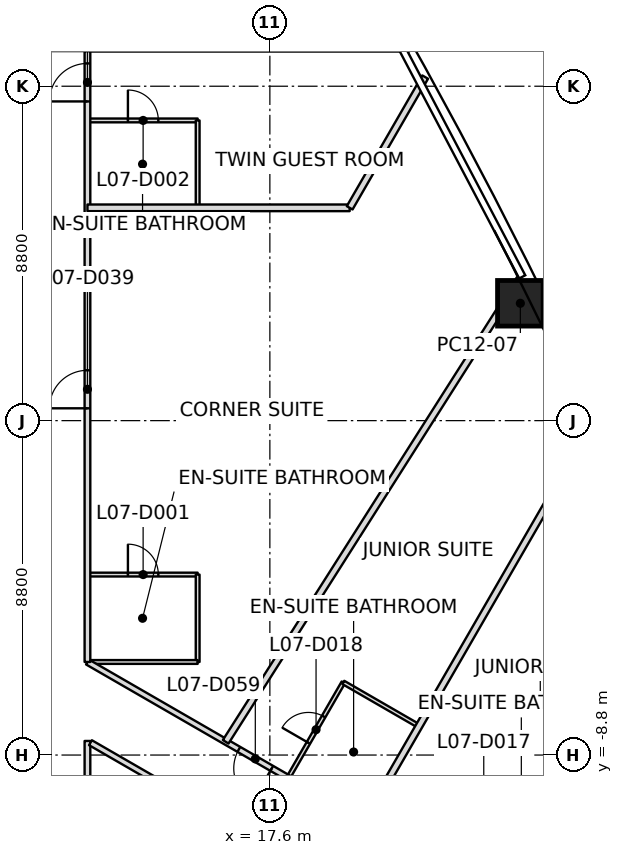
"""IFC4 building model, lengths in metres.
Left out: names, types, materials, properties, quantities, classifications, styles, units other than length and angle.
Written with IfcOpenShell. Run it as: python <this file> out.ifc"""

import sys

from ifc_helpers import new_model, si_unit, direction, frame, frame_2d, origin, origin_2d, place, context, subcontext, project, spatial, rectangle, extrude, clip, halfspace, element, fill, save


model = new_model("IFC4")
c1 = context("Model", 3, precision=1e-05, world=origin(), true_north=direction((0.0, 1.0)))
c2 = subcontext(c1, "Body", "Model", "MODEL_VIEW")
j1 = project(units=[si_unit("LENGTHUNIT", "METRE"), si_unit("PLANEANGLEUNIT", "RADIAN")], contexts=[c1])
p1 = place(None, origin())
s1 = spatial("IfcSite", under=j1, at=p1, CompositionType="ELEMENT")
p2 = place(p1, origin())
s2 = spatial("IfcBuilding", under=s1, at=p2, CompositionType="ELEMENT")
p3 = place(p2, frame((0.0, 0.0, 48.0)))
s3 = spatial("IfcBuildingStorey", under=s2, at=p3, CompositionType="ELEMENT", Elevation=48.0)
p4 = place(p3, frame((24.191, 3.088, 0.0), z_axis=(-0.015306644787, 0.002309192102, 0.99988017995), x_axis=(-0.441920685772, 0.897010601558, -0.008836751577)))
e1 = element("IfcColumn", 1, at=p4, inside=s3, PredefinedType="COLUMN", context=c2, shape_type="SweptSolid", body=[
    clip(extrude(rectangle(XDim=1.2, YDim=1.2, at=origin_2d()), origin(), (0.0, 0.0, 1.0), 3.7), halfspace(frame((0.0, 0.0, 0.003)), True)),
])
p5 = place(p3, frame((12.8, 5.6, 0.0), z_axis=(0.0, 0.0, 1.0), x_axis=(1.0, 0.0, 0.0)))
e2 = element("IfcWall", 2, at=p5, inside=s3, PredefinedType="PARTITIONING", context=c2, shape_type="SweptSolid", body=[
    extrude(rectangle(XDim=6.9, YDim=0.175, at=frame_2d((3.45, 0.0))), origin(), (0.0, 0.0, 1.0), 3.093),
])
p6 = place(p3, frame((19.7, 5.6, 0.0), z_axis=(0.0, 0.0, 1.0), x_axis=(0.500045167768, 0.865999324591, 0.0)))
e3 = element("IfcWall", 3, at=p6, inside=s3, PredefinedType="PARTITIONING", context=c2, shape_type="SweptSolid", body=[
    extrude(rectangle(XDim=3.973, YDim=0.175, at=frame_2d((1.986, 0.0))), origin(), (0.0, 0.0, 1.0), 2.934),
])
p7 = place(p3, frame((24.174, 3.728, 0.0), z_axis=(0.0, 0.0, 1.0), x_axis=(-0.536240308602, -0.844065359691, 0.0)))
e4 = element("IfcWall", 4, at=p7, inside=s3, PredefinedType="PARTITIONING", context=c2, shape_type="SweptSolid", body=[
    extrude(rectangle(XDim=14.428, YDim=0.175, at=frame_2d((7.214, 0.0))), origin(), (0.0, 0.0, 1.0), 2.947),
])
p8 = place(p3, frame((20.075, -10.551, 0.0), z_axis=(0.0, 0.0, 1.0), x_axis=(0.499996220184, 0.866027586051, 0.0)))
e5 = element("IfcWall", 5, at=p8, inside=s3, PredefinedType="PARTITIONING", context=c2, shape_type="SweptSolid", body=[
    extrude(rectangle(XDim=12.274, YDim=0.175, at=frame_2d((6.137, 0.0))), origin(), (0.0, 0.0, 1.0), 2.934),
])
p9 = place(p3, frame((24.488, -13.099, 0.0), z_axis=(0.0, 0.0, 1.0), x_axis=(0.500003147101, 0.866023586797, 0.0)))
e6 = element("IfcWall", 6, at=p9, inside=s3, PredefinedType="PARTITIONING", context=c2, shape_type="SweptSolid", body=[
    extrude(rectangle(XDim=8.508, YDim=0.175, at=frame_2d((4.254, 0.0))), origin(), (0.0, 0.0, 1.0), 2.934),
])
p10 = place(p3, frame((12.8, -9.72, 0.0), z_axis=(0.0, 0.0, 1.0), x_axis=(0.0, 1.0, 0.0)))
e7 = element("IfcWall", 7, at=p10, inside=s3, PredefinedType="PARTITIONING", context=c2, shape_type="SweptSolid", body=[
    extrude(rectangle(XDim=1.291, YDim=0.15, at=frame_2d((0.646, 0.0))), origin(), (0.0, 0.0, 1.0), 2.797),
])
p11 = place(p3, frame((12.879, -8.475, 0.0), z_axis=(0.0, 0.0, 1.0), x_axis=(0.866021836803, -0.500006178143, 0.0)))
e8 = element("IfcWall", 8, at=p11, inside=s3, PredefinedType="PARTITIONING", context=c2, shape_type="SweptSolid", body=[
    extrude(rectangle(XDim=12.365, YDim=0.15, at=frame_2d((6.182, 0.0))), origin(), (0.0, 0.0, 1.0), 2.797),
])
p12 = place(p11, frame((4.737, 0.0, 0.0)))
e9 = element("IfcOpeningElement", 9, at=p12, cuts=e8, PredefinedType="OPENING", context=c2, shape_type="SweptSolid", body=[
    extrude(rectangle(XDim=1.0, YDim=2.1, at=frame_2d((0.5, 1.05))), frame((0.0, 0.075, 0.0), z_axis=(0.0, -1.0, 0.0), x_axis=(1.0, 0.0, 0.0)), (0.0, 0.0, 1.0), 0.15),
])
p13 = place(p11, frame((10.965, 0.0, 0.0)))
e10 = element("IfcOpeningElement", 10, at=p13, cuts=e8, PredefinedType="OPENING", context=c2, shape_type="SweptSolid", body=[
    extrude(rectangle(XDim=1.0, YDim=2.1, at=frame_2d((0.5, 1.05))), frame((0.0, 0.075, 0.0), z_axis=(0.0, -1.0, 0.0), x_axis=(1.0, 0.0, 0.0)), (0.0, 0.0, 1.0), 0.15),
])
p14 = place(p3, frame((24.418, -13.059, 0.0), z_axis=(0.0, 0.0, 1.0), x_axis=(-0.866024967305, 0.500000756004, 0.0)))
e11 = element("IfcWall", 11, at=p14, inside=s3, PredefinedType="PARTITIONING", context=c2, shape_type="SweptSolid", body=[
    extrude(rectangle(XDim=13.416, YDim=0.15, at=frame_2d((6.708, 0.0))), origin(), (0.0, 0.0, 1.0), 2.947),
])
p15 = place(p14, frame((3.168, 0.0, 0.0)))
e12 = element("IfcOpeningElement", 12, at=p15, cuts=e11, PredefinedType="OPENING", context=c2, shape_type="SweptSolid", body=[
    extrude(rectangle(XDim=1.0, YDim=2.1, at=frame_2d((0.5, 1.05))), frame((0.0, 0.075, 0.0), z_axis=(0.0, -1.0, 0.0), x_axis=(1.0, 0.0, 0.0)), (0.0, 0.0, 1.0), 0.15),
])
p16 = place(p14, frame((7.815, 0.0, 0.0)))
e13 = element("IfcOpeningElement", 13, at=p16, cuts=e11, PredefinedType="OPENING", context=c2, shape_type="SweptSolid", body=[
    extrude(rectangle(XDim=1.0, YDim=2.1, at=frame_2d((0.5, 1.05))), frame((0.0, 0.075, 0.0), z_axis=(0.0, -1.0, 0.0), x_axis=(1.0, 0.0, 0.0)), (0.0, 0.0, 1.0), 0.15),
])
p17 = place(p3, frame((12.8, -6.351, 0.0), z_axis=(0.0, 0.0, 1.0), x_axis=(0.0, 1.0, 0.0)))
e14 = element("IfcWall", 14, at=p17, inside=s3, PredefinedType="PARTITIONING", context=c2, shape_type="SweptSolid", body=[
    extrude(rectangle(XDim=16.071, YDim=0.15, at=frame_2d((8.035, 0.0))), origin(), (0.0, 0.0, 1.0), 3.017),
])
p18 = place(p17, frame((6.676, 0.0, 0.0)))
e15 = element("IfcOpeningElement", 15, at=p18, cuts=e14, PredefinedType="OPENING", context=c2, shape_type="SweptSolid", body=[
    extrude(rectangle(XDim=1.0, YDim=2.1, at=frame_2d((0.5, 1.05))), frame((0.0, 0.075, 0.0), z_axis=(0.0, -1.0, 0.0), x_axis=(1.0, 0.0, 0.0)), (0.0, 0.0, 1.0), 0.15),
])
p19 = place(p17, frame((14.751, 0.0, 0.0)))
e16 = element("IfcOpeningElement", 16, at=p19, cuts=e14, PredefinedType="OPENING", context=c2, shape_type="SweptSolid", body=[
    extrude(rectangle(XDim=1.0, YDim=2.1, at=frame_2d((0.5, 1.05))), frame((0.0, 0.075, 0.0), z_axis=(0.0, -1.0, 0.0), x_axis=(1.0, 0.0, 0.0)), (0.0, 0.0, 1.0), 0.15),
])
p20 = place(p3, frame((12.83, -4.051, 0.0), z_axis=(0.0, 0.0, 1.0), x_axis=(1.0, 0.0, 0.0)))
e17 = element("IfcWall", 17, at=p20, inside=s3, PredefinedType="PARTITIONING", context=c2, shape_type="SweptSolid", body=[
    extrude(rectangle(XDim=2.87, YDim=0.1, at=frame_2d((1.435, 0.0))), origin(), (0.0, 0.0, 1.0), 3.15),
])
p21 = place(p20, frame((1.035, 0.0, 0.0)))
e18 = element("IfcOpeningElement", 18, at=p21, cuts=e17, PredefinedType="OPENING", context=c2, shape_type="SweptSolid", body=[
    extrude(rectangle(XDim=0.8, YDim=2.1, at=frame_2d((0.4, 1.05))), frame((0.0, 0.05, 0.0), z_axis=(0.0, -1.0, 0.0), x_axis=(1.0, 0.0, 0.0)), (0.0, 0.0, 1.0), 0.1),
])
p22 = place(p3, frame((15.7, -4.051, 0.0), z_axis=(0.0, 0.0, 1.0), x_axis=(0.0, -1.0, 0.0)))
e19 = element("IfcWall", 19, at=p22, inside=s3, PredefinedType="PARTITIONING", context=c2, shape_type="SweptSolid", body=[
    extrude(rectangle(XDim=2.3, YDim=0.1, at=frame_2d((1.15, 0.0))), origin(), (0.0, 0.0, 1.0), 2.947),
])
p23 = place(p3, frame((15.7, -6.351, 0.0), z_axis=(0.0, 0.0, 1.0), x_axis=(-1.0, 0.0, 0.0)))
e20 = element("IfcWall", 20, at=p23, inside=s3, PredefinedType="PARTITIONING", context=c2, shape_type="SweptSolid", body=[
    extrude(rectangle(XDim=2.84, YDim=0.1, at=frame_2d((1.42, 0.0))), origin(), (0.0, 0.0, 1.0), 2.947),
])
p24 = place(p3, frame((12.83, 7.9, 0.0), z_axis=(0.0, 0.0, 1.0), x_axis=(1.0, 0.0, 0.0)))
e21 = element("IfcWall", 21, at=p24, inside=s3, PredefinedType="PARTITIONING", context=c2, shape_type="SweptSolid", body=[
    extrude(rectangle(XDim=2.87, YDim=0.1, at=frame_2d((1.435, 0.0))), origin(), (0.0, 0.0, 1.0), 3.15),
])
p25 = place(p24, frame((1.035, 0.0, 0.0)))
e22 = element("IfcOpeningElement", 22, at=p25, cuts=e21, PredefinedType="OPENING", context=c2, shape_type="SweptSolid", body=[
    extrude(rectangle(XDim=0.8, YDim=2.1, at=frame_2d((0.4, 1.05))), frame((0.0, 0.05, 0.0), z_axis=(0.0, -1.0, 0.0), x_axis=(1.0, 0.0, 0.0)), (0.0, 0.0, 1.0), 0.1),
])
p26 = place(p3, frame((15.7, 7.9, 0.0), z_axis=(0.0, 0.0, 1.0), x_axis=(0.0, -1.0, 0.0)))
e23 = element("IfcWall", 23, at=p26, inside=s3, PredefinedType="PARTITIONING", context=c2, shape_type="SweptSolid", body=[
    extrude(rectangle(XDim=2.27, YDim=0.1, at=frame_2d((1.135, 0.0))), origin(), (0.0, 0.0, 1.0), 3.15),
])
p27 = place(p3, frame((18.098, -9.375, 0.0), z_axis=(0.0, 0.0, 1.0), x_axis=(0.499936001555, 0.866062350151, 0.0)))
e24 = element("IfcWall", 24, at=p27, inside=s3, PredefinedType="PARTITIONING", context=c2, shape_type="SweptSolid", body=[
    extrude(rectangle(XDim=2.87, YDim=0.1, at=frame_2d((1.435, 0.0))), origin(), (0.0, 0.0, 1.0), 2.947),
])
p28 = place(p27, frame((1.035, 0.0, 0.0)))
e25 = element("IfcOpeningElement", 25, at=p28, cuts=e24, PredefinedType="OPENING", context=c2, shape_type="SweptSolid", body=[
    extrude(rectangle(XDim=0.8, YDim=2.1, at=frame_2d((0.4, 1.05))), frame((0.0, 0.05, 0.0), z_axis=(0.0, -1.0, 0.0), x_axis=(1.0, 0.0, 0.0)), (0.0, 0.0, 1.0), 0.1),
])
p29 = place(p3, frame((19.533, -6.889, 0.0), z_axis=(0.0, 0.0, 1.0), x_axis=(0.866017224141, -0.500014167291, 0.0)))
e26 = element("IfcWall", 26, at=p29, inside=s3, PredefinedType="PARTITIONING", context=c2, shape_type="SweptSolid", body=[
    extrude(rectangle(XDim=2.27, YDim=0.1, at=frame_2d((1.135, 0.0))), origin(), (0.0, 0.0, 1.0), 2.947),
])
p30 = place(p18, origin())
e27 = element("IfcDoor", 27, at=p30, inside=s3, OperationType="SINGLE_SWING_LEFT", PredefinedType="DOOR", context=c2, shape_type="SweptSolid", body=[
    extrude(rectangle(XDim=1.0, YDim=2.1, at=frame_2d((0.5, 1.05))), frame((0.0, 0.025, 0.0), z_axis=(0.0, -1.0, 0.0), x_axis=(1.0, 0.0, 0.0)), (0.0, 0.0, 1.0), 0.05),
])
fill(e15, e27)
p31 = place(p21, origin())
e28 = element("IfcDoor", 28, at=p31, inside=s3, OperationType="SINGLE_SWING_RIGHT", PredefinedType="DOOR", context=c2, shape_type="SweptSolid", body=[
    extrude(rectangle(XDim=0.8, YDim=2.1, at=frame_2d((0.4, 1.05))), frame((0.0, 0.025, 0.0), z_axis=(0.0, -1.0, 0.0), x_axis=(1.0, 0.0, 0.0)), (0.0, 0.0, 1.0), 0.05),
])
fill(e18, e28)
p32 = place(p19, origin())
e29 = element("IfcDoor", 29, at=p32, inside=s3, OperationType="SINGLE_SWING_LEFT", PredefinedType="DOOR", context=c2, shape_type="SweptSolid", body=[
    extrude(rectangle(XDim=1.0, YDim=2.1, at=frame_2d((0.5, 1.05))), frame((0.0, 0.025, 0.0), z_axis=(0.0, -1.0, 0.0), x_axis=(1.0, 0.0, 0.0)), (0.0, 0.0, 1.0), 0.05),
])
fill(e16, e29)
p33 = place(p25, origin())
e30 = element("IfcDoor", 30, at=p33, inside=s3, OperationType="SINGLE_SWING_RIGHT", PredefinedType="DOOR", context=c2, shape_type="SweptSolid", body=[
    extrude(rectangle(XDim=0.8, YDim=2.1, at=frame_2d((0.4, 1.05))), frame((0.0, 0.025, 0.0), z_axis=(0.0, -1.0, 0.0), x_axis=(1.0, 0.0, 0.0)), (0.0, 0.0, 1.0), 0.05),
])
fill(e22, e30)
p34 = place(p16, origin())
e31 = element("IfcDoor", 31, at=p34, inside=s3, OperationType="SINGLE_SWING_LEFT", PredefinedType="DOOR", context=c2, shape_type="SweptSolid", body=[
    extrude(rectangle(XDim=1.0, YDim=2.1, at=frame_2d((0.5, 1.05))), frame((0.0, 0.025, 0.0), z_axis=(0.0, -1.0, 0.0), x_axis=(1.0, 0.0, 0.0)), (0.0, 0.0, 1.0), 0.05),
])
fill(e13, e31)
p35 = place(p28, origin())
e32 = element("IfcDoor", 32, at=p35, inside=s3, OperationType="SINGLE_SWING_LEFT", PredefinedType="DOOR", context=c2, shape_type="SweptSolid", body=[
    extrude(rectangle(XDim=0.8, YDim=2.1, at=frame_2d((0.4, 1.05))), frame((0.0, 0.025, 0.0), z_axis=(0.0, -1.0, 0.0), x_axis=(1.0, 0.0, 0.0)), (0.0, 0.0, 1.0), 0.05),
])
fill(e25, e32)
save(model, sys.argv[1])
